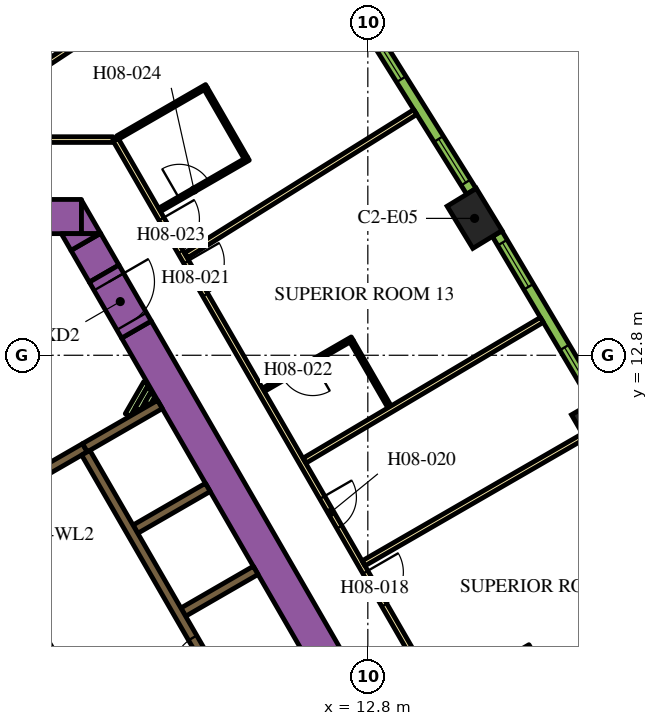
"""IFC4 building model, lengths in metres.
Left out: names, types, materials, properties, quantities, classifications, styles, units other than length and angle.
Written with IfcOpenShell. Run it as: python <this file> out.ifc"""

import sys

from ifc_helpers import new_model, si_unit, direction, frame, frame_2d, origin, origin_2d, place, context, subcontext, project, spatial, polyline, rectangle, outline, extrude, element, fill, save


model = new_model("IFC4")
c1 = context("Model", 3, precision=1e-05, world=origin(), true_north=direction((0.0, 1.0)))
c2 = subcontext(c1, "Body", "Model", "MODEL_VIEW")
j1 = project(units=[si_unit("LENGTHUNIT", "METRE"), si_unit("PLANEANGLEUNIT", "RADIAN")], contexts=[c1])
p1 = place(None, origin())
s1 = spatial("IfcSite", under=j1, at=p1, CompositionType="ELEMENT")
p2 = place(p1, origin())
s2 = spatial("IfcBuilding", under=s1, at=p2, CompositionType="ELEMENT")
p3 = place(p2, frame((0.0, 0.0, 111.0)))
s3 = spatial("IfcBuildingStorey", under=s2, at=p3, CompositionType="ELEMENT", Elevation=111.0)
for number, where, z_axis, x_axis in (
    (1, (18.874, 10.897, 0.0), (0.0, 0.0, 1.0), (-0.5, 0.866, 0.0)),
    (2, (15.609, 16.402, 0.0), (0.0, 0.0, 1.0), (-0.52, 0.854, 0.0)),
):
    element("IfcColumn", number, at=place(p3, frame(where, z_axis=z_axis, x_axis=x_axis)), inside=s3, PredefinedType="COLUMN", context=c2, shape_type="SweptSolid", body=[
        extrude(rectangle(XDim=1.3, YDim=0.9, at=origin_2d()), origin(), (0.0, 0.0, 1.0), 3.9),
    ])
p4 = place(p3, frame((6.711, 13.476, 0.0), z_axis=(0.0, 0.0, 1.0), x_axis=(0.500002723396, -0.866023831425, 0.0)))
e3 = element("IfcWall", 3, at=p4, inside=s3, PredefinedType="SOLIDWALL", context=c2, shape_type="SweptSolid", body=[
    extrude(rectangle(XDim=20.334, YDim=0.9, at=frame_2d((10.167, 0.0))), origin(), (0.0, 0.0, 1.0), 3.9),
])
p5 = place(p3, frame((-4.224, 16.45, 0.0), z_axis=(0.0, 0.0, 1.0), x_axis=(1.0, 0.0, 0.0)))
e4 = element("IfcWall", 4, at=p5, inside=s3, PredefinedType="SOLIDWALL", context=c2, shape_type="SweptSolid", body=[
    extrude(rectangle(XDim=9.488, YDim=0.9, at=frame_2d((4.744, 0.0))), origin(), (0.0, 0.0, 1.0), 3.9),
])
p6 = place(p3, origin())
e5 = element("IfcWall", 5, at=p6, inside=s3, PredefinedType="SOLIDWALL", context=c2, shape_type="SweptSolid", body=[
    extrude(outline(polyline([(5.265, 16.0), (5.265, 16.88), (5.773, 16.0), (5.265, 16.0)])), origin(), (0.0, 0.0, 1.0), 3.9),
])
p7 = place(p3, frame((5.861, 14.949, 0.0), z_axis=(0.0, 0.0, 1.0), x_axis=(-0.50011719232, 0.865957732194, 0.0)))
e6 = element("IfcWall", 6, at=p7, inside=s3, PredefinedType="SOLIDWALL", context=c2, shape_type="SweptSolid", body=[
    extrude(rectangle(XDim=0.964, YDim=0.9, at=frame_2d((0.482, 0.0))), origin(), (0.0, 0.0, 1.0), 3.9),
])
e7 = element("IfcWall", 7, at=p6, inside=s3, PredefinedType="SOLIDWALL", context=c2, shape_type="SweptSolid", body=[
    extrude(outline(polyline([(4.734, 16.0), (5.75, 16.0), (4.988, 15.56), (4.734, 16.0)])), origin(), (0.0, 0.0, 1.0), 3.9),
])
e8 = element("IfcWall", 8, at=p6, inside=s3, PredefinedType="SOLIDWALL", context=c2, shape_type="SweptSolid", body=[
    extrude(outline(polyline([(0.566, 6.725), (0.566, 6.875), (0.566, 6.875), (0.565, 6.875), (0.361, 6.875), (0.035, 7.439), (0.252, 7.564), (0.377, 7.348), (6.552, -3.348), (6.677, -3.564), (6.46, -3.689), (0.448, 6.725), (0.565, 6.725), (0.566, 6.725), (0.566, 6.725)])), origin(), (0.0, 0.0, 1.0), 3.9),
])
p8 = place(p3, frame((4.358, 9.791, 0.0), z_axis=(0.0, 0.0, 1.0), x_axis=(0.866079547155, 0.499906209203, 0.0)))
e9 = element("IfcWall", 9, at=p8, inside=s3, PredefinedType="SOLIDWALL", context=c2, shape_type="SweptSolid", body=[
    extrude(rectangle(XDim=1.15, YDim=0.25, at=frame_2d((0.575, 0.0))), origin(), (0.0, 0.0, 1.0), 3.9),
])
p9 = place(p3, frame((5.356, 10.367, 0.0), z_axis=(0.0, 0.0, 1.0), x_axis=(0.865978535641, 0.50008116922, 0.0)))
e10 = element("IfcWall", 10, at=p9, inside=s3, PredefinedType="SOLIDWALL", context=c2, shape_type="SweptSolid", body=[
    extrude(rectangle(XDim=2.278, YDim=0.25, at=frame_2d((1.139, 0.0))), origin(), (0.0, 0.0, 1.0), 3.9),
])
for number, where, z_axis, x_axis in (
    (11, (6.684, 8.224, 0.0), (0.0, 0.0, 1.0), (0.866, 0.5, 0.0)),
    (12, (7.944, 6.041, 0.0), (0.0, 0.0, 1.0), (0.866, 0.5, 0.0)),
):
    element("IfcWall", number, at=place(p3, frame(where, z_axis=z_axis, x_axis=x_axis)), inside=s3, PredefinedType="SOLIDWALL", context=c2, shape_type="SweptSolid", body=[
        extrude(rectangle(XDim=2.2, YDim=0.25, at=frame_2d((1.1, 0.0))), origin(), (0.0, 0.0, 1.0), 3.9),
    ])
p10 = place(p3, frame((6.482, 11.225, 0.0), z_axis=(0.0, 0.0, 1.0), x_axis=(0.5001061818, 0.865964091014, 0.0)))
e13 = element("IfcWall", 13, at=p10, inside=s3, PredefinedType="PARTITIONING", context=c2, shape_type="SweptSolid", body=[
    extrude(rectangle(XDim=0.973, YDim=0.15, at=frame_2d((0.486, 0.0))), origin(), (0.0, 0.0, 1.0), 2.75),
])
p11 = place(p3, frame((6.742, 11.375, 0.0), z_axis=(0.0, 0.0, 1.0), x_axis=(0.499744951064, 0.86617260629, 0.0)))
e14 = element("IfcWall", 14, at=p11, inside=s3, PredefinedType="PARTITIONING", context=c2, shape_type="SweptSolid", body=[
    extrude(rectangle(XDim=0.626, YDim=0.15, at=frame_2d((0.313, 0.0))), origin(), (0.0, 0.0, 1.0), 2.75),
])
p12 = place(p3, frame((7.001, 11.525, 0.0), z_axis=(0.0, 0.0, 1.0), x_axis=(0.499797962495, 0.866142018774, 0.0)))
e15 = element("IfcWall", 15, at=p12, inside=s3, PredefinedType="PARTITIONING", context=c2, shape_type="SweptSolid", body=[
    extrude(rectangle(XDim=0.28, YDim=0.15, at=frame_2d((0.14, 0.0))), origin(), (0.0, 0.0, 1.0), 2.75),
])
p13 = place(p3, frame((11.553, -0.46, 0.0), z_axis=(0.0, 0.0, 1.0), x_axis=(-0.500006514828, 0.866021642414, 0.0)))
e16 = element("IfcWall", 16, at=p13, inside=s3, PredefinedType="SOLIDWALL", context=c2, shape_type="SweptSolid", body=[
    extrude(rectangle(XDim=12.35, YDim=0.25, at=frame_2d((6.175, 0.0))), origin(), (0.0, 0.0, 1.0), 3.9),
])
p14 = place(p13, frame((0.585, 0.0, 0.0)))
e17 = element("IfcOpeningElement", 17, at=p14, cuts=e16, PredefinedType="OPENING", context=c2, shape_type="SweptSolid", body=[
    extrude(rectangle(XDim=1.1, YDim=2.1, at=frame_2d((0.55, 1.05))), frame((0.0, 0.135, 0.0), z_axis=(0.0, -1.0, 0.0), x_axis=(1.0, 0.0, 0.0)), (0.0, 0.0, 1.0), 0.27),
])
p15 = place(p13, frame((3.105, 0.0, 0.0)))
e18 = element("IfcOpeningElement", 18, at=p15, cuts=e16, PredefinedType="OPENING", context=c2, shape_type="SweptSolid", body=[
    extrude(rectangle(XDim=1.1, YDim=2.1, at=frame_2d((0.55, 1.05))), frame((0.0, 0.135, 0.0), z_axis=(0.0, -1.0, 0.0), x_axis=(1.0, 0.0, 0.0)), (0.0, 0.0, 1.0), 0.27),
])
p16 = place(p13, frame((5.625, 0.0, 0.0)))
e19 = element("IfcOpeningElement", 19, at=p16, cuts=e16, PredefinedType="OPENING", context=c2, shape_type="SweptSolid", body=[
    extrude(rectangle(XDim=1.1, YDim=2.1, at=frame_2d((0.55, 1.05))), frame((0.0, 0.135, 0.0), z_axis=(0.0, -1.0, 0.0), x_axis=(1.0, 0.0, 0.0)), (0.0, 0.0, 1.0), 0.27),
])
p17 = place(p3, frame((8.565, -2.185, 0.0), z_axis=(0.0, 0.0, 1.0), x_axis=(-0.499997954832, 0.866026584559, 0.0)))
e20 = element("IfcWall", 20, at=p17, inside=s3, PredefinedType="SOLIDWALL", context=c2, shape_type="SweptSolid", body=[
    extrude(rectangle(XDim=12.35, YDim=0.25, at=frame_2d((6.175, 0.0))), origin(), (0.0, 0.0, 1.0), 3.9),
])
p18 = place(p17, frame((5.725, 0.0, 0.0)))
e21 = element("IfcOpeningElement", 21, at=p18, cuts=e20, PredefinedType="OPENING", context=c2, shape_type="SweptSolid", body=[
    extrude(rectangle(XDim=0.9, YDim=2.1, at=frame_2d((0.45, 1.05))), frame((0.0, 0.135, 0.0), z_axis=(0.0, -1.0, 0.0), x_axis=(1.0, 0.0, 0.0)), (0.0, 0.0, 1.0), 0.27),
])
p19 = place(p3, frame((5.861, 14.948, 0.0), z_axis=(0.0, 0.0, 1.0), x_axis=(0.500062241894, -0.865989465428, 0.0)))
e22 = element("IfcWall", 22, at=p19, inside=s3, PredefinedType="SOLIDWALL", context=c2, shape_type="SweptSolid", body=[
    extrude(rectangle(XDim=1.7, YDim=0.9, at=frame_2d((0.85, 0.0))), origin(), (0.0, 0.0, 1.0), 3.9),
])
p20 = place(p19, frame((0.25, 0.0, 0.0)))
e23 = element("IfcOpeningElement", 23, at=p20, cuts=e22, PredefinedType="OPENING", context=c2, shape_type="SweptSolid", body=[
    extrude(rectangle(XDim=1.2, YDim=2.1, at=frame_2d((0.6, 1.05))), frame((0.0, 0.46, 0.0), z_axis=(0.0, -1.0, 0.0), x_axis=(1.0, 0.0, 0.0)), (0.0, 0.0, 1.0), 0.92),
])
p21 = place(p3, frame((6.163, 18.475, 0.0), z_axis=(0.0, 0.0, 1.0), x_axis=(0.500001317485, -0.866024643133, 0.0)))
e24 = element("IfcWall", 24, at=p21, inside=s3, PredefinedType="PARTITIONING", context=c2, shape_type="SweptSolid", body=[
    extrude(rectangle(XDim=25.767, YDim=0.15, at=frame_2d((12.883, 0.0))), origin(), (0.0, 0.0, 1.0), 2.75),
])
p22 = place(p21, frame((24.241, 0.0, 0.0)))
e25 = element("IfcOpeningElement", 25, at=p22, cuts=e24, PredefinedType="OPENING", context=c2, shape_type="SweptSolid", body=[
    extrude(rectangle(XDim=1.0, YDim=2.1, at=frame_2d((0.5, 1.05))), frame((0.0, 0.085, 0.0), z_axis=(0.0, -1.0, 0.0), x_axis=(1.0, 0.0, 0.0)), (0.0, 0.0, 1.0), 0.17),
])
p23 = place(p21, frame((13.144, 0.0, 0.0)))
e26 = element("IfcOpeningElement", 26, at=p23, cuts=e24, PredefinedType="OPENING", context=c2, shape_type="SweptSolid", body=[
    extrude(rectangle(XDim=1.0, YDim=2.1, at=frame_2d((0.5, 1.05))), frame((0.0, 0.085, 0.0), z_axis=(0.0, -1.0, 0.0), x_axis=(1.0, 0.0, 0.0)), (0.0, 0.0, 1.0), 0.17),
])
p24 = place(p21, frame((10.874, 0.0, 0.0)))
e27 = element("IfcOpeningElement", 27, at=p24, cuts=e24, PredefinedType="OPENING", context=c2, shape_type="SweptSolid", body=[
    extrude(rectangle(XDim=0.9, YDim=2.1, at=frame_2d((0.45, 1.05))), frame((0.0, 0.085, 0.0), z_axis=(0.0, -1.0, 0.0), x_axis=(1.0, 0.0, 0.0)), (0.0, 0.0, 1.0), 0.17),
])
p25 = place(p21, frame((3.718, 0.0, 0.0)))
e28 = element("IfcOpeningElement", 28, at=p25, cuts=e24, PredefinedType="OPENING", context=c2, shape_type="SweptSolid", body=[
    extrude(rectangle(XDim=1.0, YDim=2.1, at=frame_2d((0.5, 1.05))), frame((0.0, 0.085, 0.0), z_axis=(0.0, -1.0, 0.0), x_axis=(1.0, 0.0, 0.0)), (0.0, 0.0, 1.0), 0.17),
])
p26 = place(p21, frame((2.411, 0.0, 0.0)))
e29 = element("IfcOpeningElement", 29, at=p26, cuts=e24, PredefinedType="OPENING", context=c2, shape_type="SweptSolid", body=[
    extrude(rectangle(XDim=1.0, YDim=2.1, at=frame_2d((0.5, 1.05))), frame((0.0, 0.085, 0.0), z_axis=(0.0, -1.0, 0.0), x_axis=(1.0, 0.0, 0.0)), (0.0, 0.0, 1.0), 0.17),
])
p27 = place(p3, frame((0.825, 18.475, 0.0), z_axis=(0.0, 0.0, 1.0), x_axis=(1.0, 0.0, 0.0)))
e30 = element("IfcWall", 30, at=p27, inside=s3, PredefinedType="PARTITIONING", context=c2, shape_type="SweptSolid", body=[
    extrude(rectangle(XDim=5.268, YDim=0.15, at=frame_2d((2.634, 0.0))), origin(), (0.0, 0.0, 1.0), 2.75),
])
p28 = place(p3, frame((10.592, 24.589, 0.0), z_axis=(0.0, 0.0, 1.0), x_axis=(-0.835337323748, -0.549737715236, 0.0)))
e31 = element("IfcWall", 31, at=p28, inside=s3, PredefinedType="PARTITIONING", context=c2, shape_type="SweptSolid", body=[
    extrude(rectangle(XDim=10.875, YDim=0.15, at=frame_2d((5.438, 0.0))), origin(), (0.0, 0.0, 1.0), 2.75),
])
p29 = place(p3, frame((14.049, 19.2, 0.0), z_axis=(0.0, 0.0, 1.0), x_axis=(-0.847955867271, -0.530066832731, 0.0)))
e32 = element("IfcWall", 32, at=p29, inside=s3, PredefinedType="PARTITIONING", context=c2, shape_type="SweptSolid", body=[
    extrude(rectangle(XDim=7.111, YDim=0.15, at=frame_2d((3.556, 0.0))), origin(), (0.0, 0.0, 1.0), 2.75),
])
p30 = place(p3, frame((17.379, 13.731, 0.0), z_axis=(0.0, 0.0, 1.0), x_axis=(-0.860132461691, -0.510070728768, 0.0)))
e33 = element("IfcWall", 33, at=p30, inside=s3, PredefinedType="PARTITIONING", context=c2, shape_type="SweptSolid", body=[
    extrude(rectangle(XDim=7.257, YDim=0.15, at=frame_2d((3.628, 0.0))), origin(), (0.0, 0.0, 1.0), 2.75),
])
p31 = place(p3, frame((18.484, 10.672, 0.0), z_axis=(0.0, 0.0, 1.0), x_axis=(-0.866019162053, -0.50001081084, 0.0)))
e34 = element("IfcWall", 34, at=p31, inside=s3, PredefinedType="PARTITIONING", context=c2, shape_type="SweptSolid", body=[
    extrude(rectangle(XDim=6.694, YDim=0.15, at=frame_2d((3.347, 0.0))), origin(), (0.0, 0.0, 1.0), 2.75),
])
p32 = place(p3, frame((21.614, 5.102, 0.0), z_axis=(0.0, 0.0, 1.0), x_axis=(-0.877484555087, -0.479604895287, 0.0)))
e35 = element("IfcWall", 35, at=p32, inside=s3, PredefinedType="PARTITIONING", context=c2, shape_type="SweptSolid", body=[
    extrude(rectangle(XDim=6.611, YDim=0.15, at=frame_2d((3.306, 0.0))), origin(), (0.0, 0.0, 1.0), 2.75),
])
p33 = place(p3, frame((17.066, 5.141, 0.0), z_axis=(0.0, 0.0, 1.0), x_axis=(-0.866059108428, -0.4999416173, 0.0)))
e36 = element("IfcWall", 36, at=p33, inside=s3, PredefinedType="PARTITIONING", context=c2, shape_type="SweptSolid", body=[
    extrude(rectangle(XDim=2.7, YDim=0.1, at=frame_2d((1.35, 0.0))), origin(), (0.0, 0.0, 1.0), 2.75),
])
p34 = place(p33, frame((1.2, 0.0, 0.0)))
e37 = element("IfcOpeningElement", 37, at=p34, cuts=e36, PredefinedType="OPENING", context=c2, shape_type="SweptSolid", body=[
    extrude(rectangle(XDim=0.9, YDim=2.1, at=frame_2d((0.45, 1.05))), frame((0.0, 0.06, 0.0), z_axis=(0.0, -1.0, 0.0), x_axis=(1.0, 0.0, 0.0)), (0.0, 0.0, 1.0), 0.12),
])
p35 = place(p3, frame((12.39, 13.239, 0.0), z_axis=(0.0, 0.0, 1.0), x_axis=(-0.866036505625, -0.499980770555, 0.0)))
e38 = element("IfcWall", 38, at=p35, inside=s3, PredefinedType="PARTITIONING", context=c2, shape_type="SweptSolid", body=[
    extrude(rectangle(XDim=2.7, YDim=0.1, at=frame_2d((1.35, 0.0))), origin(), (0.0, 0.0, 1.0), 2.75),
])
p36 = place(p35, frame((1.2, 0.0, 0.0)))
e39 = element("IfcOpeningElement", 39, at=p36, cuts=e38, PredefinedType="OPENING", context=c2, shape_type="SweptSolid", body=[
    extrude(rectangle(XDim=0.9, YDim=2.1, at=frame_2d((0.45, 1.05))), frame((0.0, 0.06, 0.0), z_axis=(0.0, -1.0, 0.0), x_axis=(1.0, 0.0, 0.0)), (0.0, 0.0, 1.0), 0.12),
])
p37 = place(p3, frame((12.372, 13.171, 0.0), z_axis=(0.0, 0.0, 1.0), x_axis=(0.500044573643, -0.86599966765, 0.0)))
e40 = element("IfcWall", 40, at=p37, inside=s3, PredefinedType="PARTITIONING", context=c2, shape_type="SweptSolid", body=[
    extrude(rectangle(XDim=1.99, YDim=0.1, at=frame_2d((0.995, 0.0))), origin(), (0.0, 0.0, 1.0), 2.75),
])
p38 = place(p3, frame((7.318, 16.625, 0.0), z_axis=(0.0, 0.0, 1.0), x_axis=(0.866019956843, 0.50000943426, 0.0)))
e41 = element("IfcWall", 41, at=p38, inside=s3, PredefinedType="PARTITIONING", context=c2, shape_type="SweptSolid", body=[
    extrude(rectangle(XDim=2.7, YDim=0.1, at=frame_2d((1.35, 0.0))), origin(), (0.0, 0.0, 1.0), 2.75),
])
p39 = place(p38, frame((0.6, 0.0, 0.0)))
e42 = element("IfcOpeningElement", 42, at=p39, cuts=e41, PredefinedType="OPENING", context=c2, shape_type="SweptSolid", body=[
    extrude(rectangle(XDim=0.9, YDim=2.1, at=frame_2d((0.45, 1.05))), frame((0.0, 0.06, 0.0), z_axis=(0.0, -1.0, 0.0), x_axis=(1.0, 0.0, 0.0)), (0.0, 0.0, 1.0), 0.12),
])
p40 = place(p3, frame((9.588, 17.993, 0.0), z_axis=(0.0, 0.0, 1.0), x_axis=(-0.500027713859, 0.866009402589, 0.0)))
e43 = element("IfcWall", 43, at=p40, inside=s3, PredefinedType="PARTITIONING", context=c2, shape_type="SweptSolid", body=[
    extrude(rectangle(XDim=2.1, YDim=0.1, at=frame_2d((1.05, 0.0))), origin(), (0.0, 0.0, 1.0), 2.75),
])
p41 = place(p3, frame((6.218, 18.53, 0.0), z_axis=(0.0, 0.0, 1.0), x_axis=(0.86599734893, 0.500048589285, 0.0)))
e44 = element("IfcWall", 44, at=p41, inside=s3, PredefinedType="PARTITIONING", context=c2, shape_type="SweptSolid", body=[
    extrude(rectangle(XDim=2.7, YDim=0.1, at=frame_2d((1.35, 0.0))), origin(), (0.0, 0.0, 1.0), 2.75),
])
p42 = place(p3, frame((18.805, 11.611, 0.0), z_axis=(0.0, 0.0, 1.0), x_axis=(-0.510054281659, 0.860142214847, 0.0)))
e45 = element("IfcWall", 45, at=p42, inside=s3, PredefinedType="SOLIDWALL", context=c2, shape_type="SweptSolid", body=[
    extrude(rectangle(XDim=5.101, YDim=0.29, at=frame_2d((2.55, 0.0))), origin(), (0.0, 0.0, 1.0), 3.65),
])
p43 = place(p42, frame((0.273, 0.0, 0.9)))
e46 = element("IfcOpeningElement", 46, at=p43, cuts=e45, PredefinedType="OPENING", context=c2, shape_type="SweptSolid", body=[
    extrude(rectangle(XDim=1.35, YDim=2.15, at=frame_2d((0.675, 1.075))), frame((0.0, 0.155, 0.0), z_axis=(0.0, -1.0, 0.0), x_axis=(1.0, 0.0, 0.0)), (0.0, 0.0, 1.0), 0.31),
])
p44 = place(p42, frame((3.478, 0.0, 0.9)))
e47 = element("IfcOpeningElement", 47, at=p44, cuts=e45, PredefinedType="OPENING", context=c2, shape_type="SweptSolid", body=[
    extrude(rectangle(XDim=1.35, YDim=2.15, at=frame_2d((0.675, 1.075))), frame((0.0, 0.155, 0.0), z_axis=(0.0, -1.0, 0.0), x_axis=(1.0, 0.0, 0.0)), (0.0, 0.0, 1.0), 0.31),
])
p45 = place(p3, frame((15.524, 17.114, 0.0), z_axis=(0.0, 0.0, 1.0), x_axis=(-0.530072082134, 0.847952585787, 0.0)))
e48 = element("IfcWall", 48, at=p45, inside=s3, PredefinedType="SOLIDWALL", context=c2, shape_type="SweptSolid", body=[
    extrude(rectangle(XDim=5.1, YDim=0.29, at=frame_2d((2.55, 0.0))), origin(), (0.0, 0.0, 1.0), 3.65),
])
p46 = place(p45, frame((0.273, 0.0, 0.9)))
e49 = element("IfcOpeningElement", 49, at=p46, cuts=e48, PredefinedType="OPENING", context=c2, shape_type="SweptSolid", body=[
    extrude(rectangle(XDim=1.35, YDim=2.15, at=frame_2d((0.675, 1.075))), frame((0.0, 0.155, 0.0), z_axis=(0.0, -1.0, 0.0), x_axis=(1.0, 0.0, 0.0)), (0.0, 0.0, 1.0), 0.31),
])
p47 = place(p45, frame((3.478, 0.0, 0.9)))
e50 = element("IfcOpeningElement", 50, at=p47, cuts=e48, PredefinedType="OPENING", context=c2, shape_type="SweptSolid", body=[
    extrude(rectangle(XDim=1.35, YDim=2.15, at=frame_2d((0.675, 1.075))), frame((0.0, 0.155, 0.0), z_axis=(0.0, -1.0, 0.0), x_axis=(1.0, 0.0, 0.0)), (0.0, 0.0, 1.0), 0.31),
])
p48 = place(p16, origin())
e51 = element("IfcDoor", 51, at=p48, inside=s3, OperationType="DOUBLE_DOOR_SLIDING", PredefinedType="DOOR", context=c2, shape_type="SweptSolid", body=[
    extrude(rectangle(XDim=1.1, YDim=2.1, at=frame_2d((0.55, 1.05))), frame((0.0, 0.025, 0.0), z_axis=(0.0, -1.0, 0.0), x_axis=(1.0, 0.0, 0.0)), (0.0, 0.0, 1.0), 0.05),
])
fill(e19, e51)
p49 = place(p20, origin())
e52 = element("IfcDoor", 52, at=p49, inside=s3, OperationType="SINGLE_SWING_LEFT", PredefinedType="DOOR", context=c2, shape_type="SweptSolid", body=[
    extrude(rectangle(XDim=1.2, YDim=2.1, at=frame_2d((0.6, 1.05))), frame((0.0, 0.025, 0.0), z_axis=(0.0, -1.0, 0.0), x_axis=(1.0, 0.0, 0.0)), (0.0, 0.0, 1.0), 0.05),
])
fill(e23, e52)
p50 = place(p23, origin())
e53 = element("IfcDoor", 53, at=p50, inside=s3, OperationType="SINGLE_SWING_LEFT", PredefinedType="DOOR", context=c2, shape_type="SweptSolid", body=[
    extrude(rectangle(XDim=1.0, YDim=2.1, at=frame_2d((0.5, 1.05))), frame((0.0, 0.025, 0.0), z_axis=(0.0, -1.0, 0.0), x_axis=(1.0, 0.0, 0.0)), (0.0, 0.0, 1.0), 0.05),
])
fill(e26, e53)
p51 = place(p24, origin())
e54 = element("IfcDoor", 54, at=p51, inside=s3, OperationType="SINGLE_SWING_RIGHT", PredefinedType="DOOR", context=c2, shape_type="SweptSolid", body=[
    extrude(rectangle(XDim=0.9, YDim=2.1, at=frame_2d((0.45, 1.05))), frame((0.0, 0.025, 0.0), z_axis=(0.0, -1.0, 0.0), x_axis=(1.0, 0.0, 0.0)), (0.0, 0.0, 1.0), 0.05),
])
fill(e27, e54)
p52 = place(p25, origin())
e55 = element("IfcDoor", 55, at=p52, inside=s3, OperationType="SINGLE_SWING_LEFT", PredefinedType="DOOR", context=c2, shape_type="SweptSolid", body=[
    extrude(rectangle(XDim=1.0, YDim=2.1, at=frame_2d((0.5, 1.05))), frame((0.0, 0.025, 0.0), z_axis=(0.0, -1.0, 0.0), x_axis=(1.0, 0.0, 0.0)), (0.0, 0.0, 1.0), 0.05),
])
fill(e28, e55)
p53 = place(p36, origin())
e56 = element("IfcDoor", 56, at=p53, inside=s3, OperationType="SINGLE_SWING_LEFT", PredefinedType="DOOR", context=c2, shape_type="SweptSolid", body=[
    extrude(rectangle(XDim=0.9, YDim=2.1, at=frame_2d((0.45, 1.05))), frame((0.0, 0.025, 0.0), z_axis=(0.0, -1.0, 0.0), x_axis=(1.0, 0.0, 0.0)), (0.0, 0.0, 1.0), 0.05),
])
fill(e39, e56)
p54 = place(p26, origin())
e57 = element("IfcDoor", 57, at=p54, inside=s3, OperationType="SINGLE_SWING_RIGHT", PredefinedType="DOOR", context=c2, shape_type="SweptSolid", body=[
    extrude(rectangle(XDim=1.0, YDim=2.1, at=frame_2d((0.5, 1.05))), frame((0.0, 0.025, 0.0), z_axis=(0.0, -1.0, 0.0), x_axis=(1.0, 0.0, 0.0)), (0.0, 0.0, 1.0), 0.05),
])
fill(e29, e57)
p55 = place(p39, origin())
e58 = element("IfcDoor", 58, at=p55, inside=s3, OperationType="SINGLE_SWING_LEFT", PredefinedType="DOOR", context=c2, shape_type="SweptSolid", body=[
    extrude(rectangle(XDim=0.9, YDim=2.1, at=frame_2d((0.45, 1.05))), frame((0.0, 0.025, 0.0), z_axis=(0.0, -1.0, 0.0), x_axis=(1.0, 0.0, 0.0)), (0.0, 0.0, 1.0), 0.05),
])
fill(e42, e58)
p56 = place(p43, origin())
e59 = element("IfcWindow", 59, at=p56, inside=s3, PartitioningType="DOUBLE_PANEL_VERTICAL", PredefinedType="WINDOW", context=c2, shape_type="SweptSolid", body=[
    extrude(rectangle(XDim=1.35, YDim=2.15, at=frame_2d((0.675, 1.075))), frame((0.0, 0.015, 0.0), z_axis=(0.0, -1.0, 0.0), x_axis=(1.0, 0.0, 0.0)), (0.0, 0.0, 1.0), 0.06),
])
fill(e46, e59)
p57 = place(p44, origin())
e60 = element("IfcWindow", 60, at=p57, inside=s3, PartitioningType="DOUBLE_PANEL_VERTICAL", PredefinedType="WINDOW", context=c2, shape_type="SweptSolid", body=[
    extrude(rectangle(XDim=1.35, YDim=2.15, at=frame_2d((0.675, 1.075))), frame((0.0, 0.015, 0.0), z_axis=(0.0, -1.0, 0.0), x_axis=(1.0, 0.0, 0.0)), (0.0, 0.0, 1.0), 0.06),
])
fill(e47, e60)
p58 = place(p46, origin())
e61 = element("IfcWindow", 61, at=p58, inside=s3, PartitioningType="DOUBLE_PANEL_VERTICAL", PredefinedType="WINDOW", context=c2, shape_type="SweptSolid", body=[
    extrude(rectangle(XDim=1.35, YDim=2.15, at=frame_2d((0.675, 1.075))), frame((0.0, 0.015, 0.0), z_axis=(0.0, -1.0, 0.0), x_axis=(1.0, 0.0, 0.0)), (0.0, 0.0, 1.0), 0.06),
])
fill(e49, e61)
p59 = place(p47, origin())
e62 = element("IfcWindow", 62, at=p59, inside=s3, PartitioningType="DOUBLE_PANEL_VERTICAL", PredefinedType="WINDOW", context=c2, shape_type="SweptSolid", body=[
    extrude(rectangle(XDim=1.35, YDim=2.15, at=frame_2d((0.675, 1.075))), frame((0.0, 0.015, 0.0), z_axis=(0.0, -1.0, 0.0), x_axis=(1.0, 0.0, 0.0)), (0.0, 0.0, 1.0), 0.06),
])
fill(e50, e62)
save(model, sys.argv[1])
